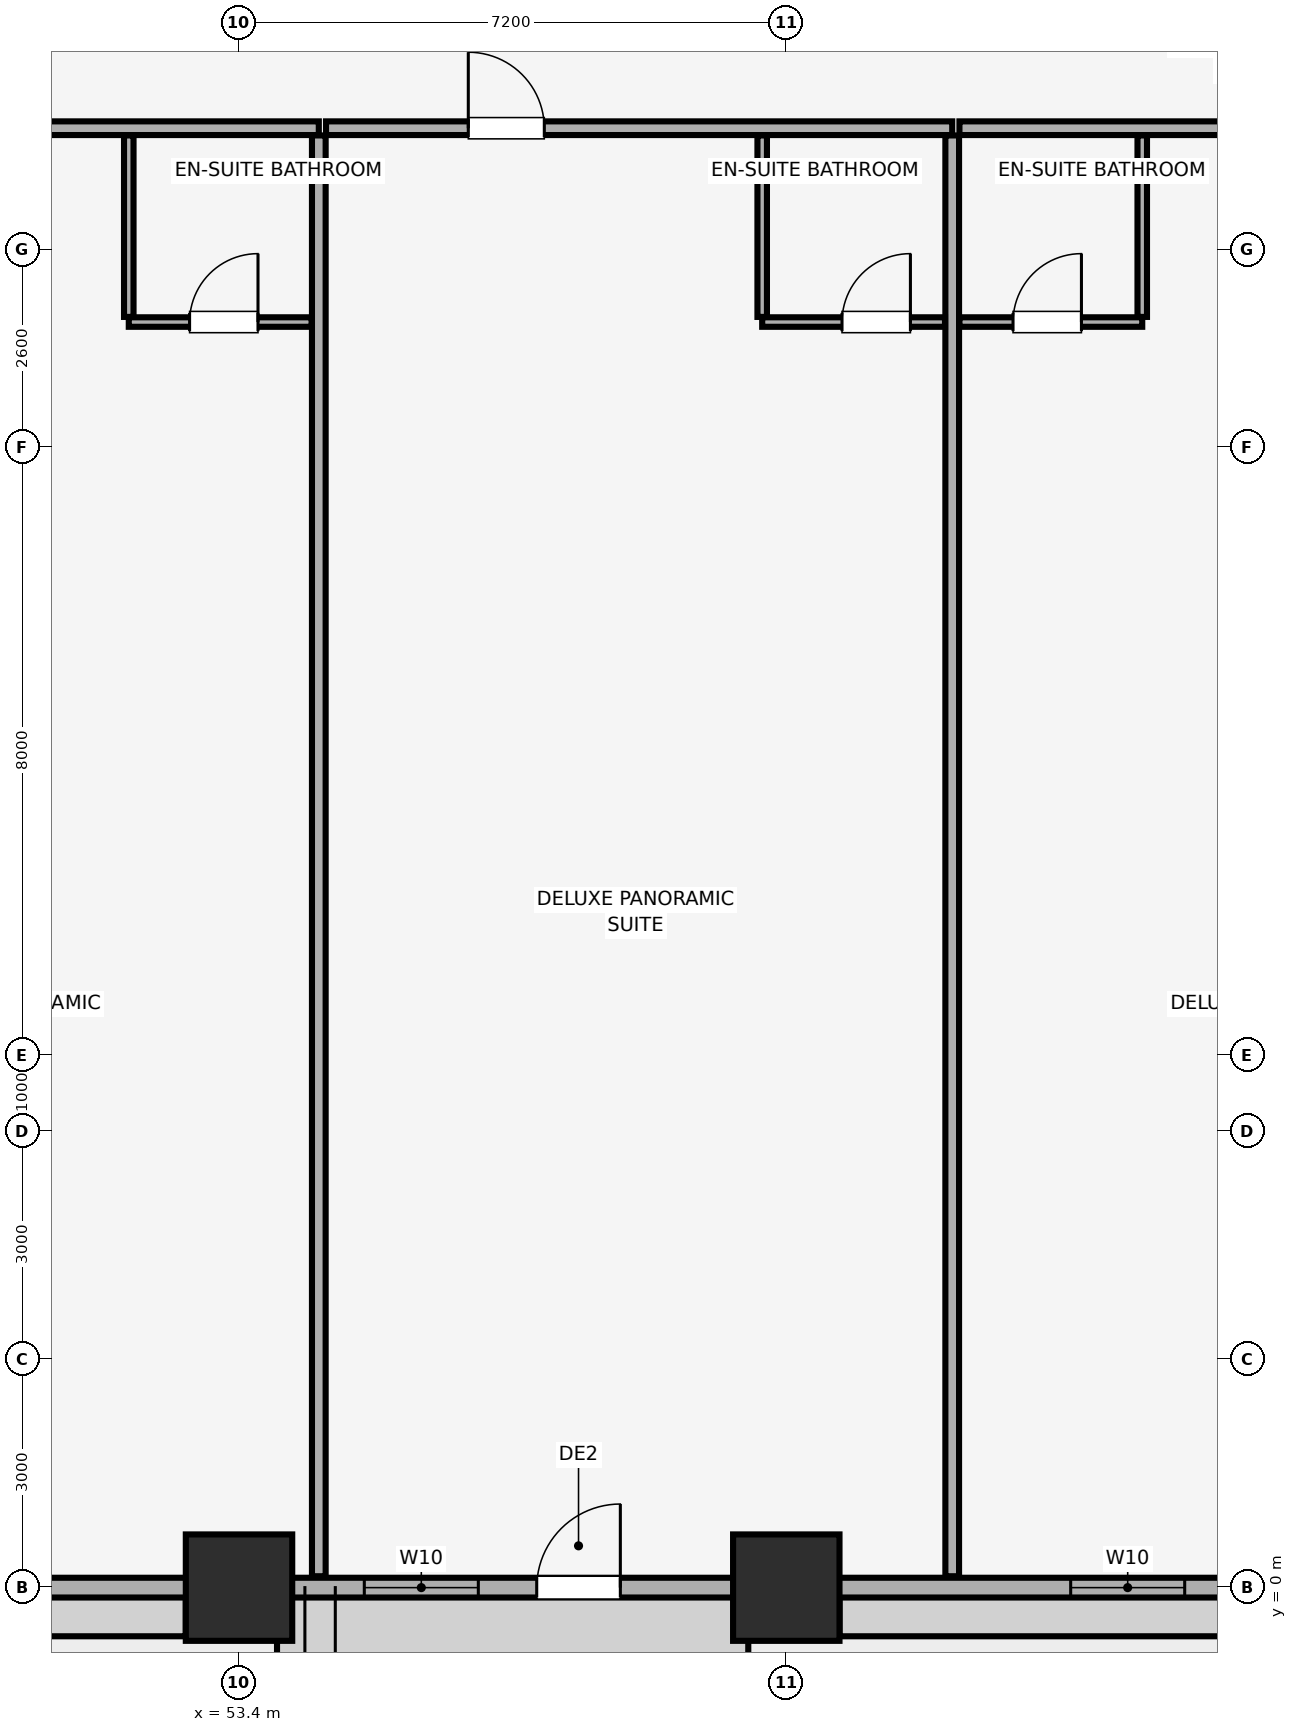
"""IFC4 building model, lengths in metres.
Left out: names, types, materials, properties, quantities, classifications, styles, units other than length and angle.
Written with IfcOpenShell. Run it as: python <this file> out.ifc"""

import sys

from ifc_helpers import new_model, si_unit, direction, frame, frame_2d, origin, origin_2d, place, context, subcontext, project, spatial, rectangle, extrude, element, fill, save


model = new_model("IFC4")
c1 = context("Model", 3, precision=1e-05, world=origin(), true_north=direction((0.0, 1.0)))
c2 = subcontext(c1, "Body", "Model", "MODEL_VIEW")
j1 = project(units=[si_unit("LENGTHUNIT", "METRE"), si_unit("PLANEANGLEUNIT", "RADIAN")], contexts=[c1])
p1 = place(None, origin())
s1 = spatial("IfcSite", under=j1, at=p1, CompositionType="ELEMENT")
p2 = place(p1, origin())
s2 = spatial("IfcBuilding", under=s1, at=p2, CompositionType="ELEMENT")
p3 = place(p2, frame((0.0, 0.0, 76.4)))
s3 = spatial("IfcBuildingStorey", under=s2, at=p3, CompositionType="ELEMENT", Elevation=76.4)
for number, where, z_axis, x_axis in (
    (1, (53.4, 0.0, 0.0), (0.0, 0.0, 1.0), (1.0, 0.0, 0.0)),
    (2, (60.6, 0.0, 0.0), (0.0, 0.0, 1.0), (1.0, 0.0, 0.0)),
):
    element("IfcColumn", number, at=place(p3, frame(where, z_axis=z_axis, x_axis=x_axis)), inside=s3, PredefinedType="COLUMN", context=c2, shape_type="SweptSolid", body=[
        extrude(rectangle(XDim=1.4, YDim=1.4, at=origin_2d()), origin(), (0.0, 0.0, 1.0), 3.4),
    ])
p4 = place(p3, frame((4.2, 0.0, 0.0), z_axis=(0.0, 0.0, 1.0), x_axis=(1.0, 0.0, 0.0)))
e3 = element("IfcWall", 3, at=p4, inside=s3, PredefinedType="SOLIDWALL", context=c2, shape_type="SweptSolid", body=[
    extrude(rectangle(XDim=75.6, YDim=0.26, at=frame_2d((37.8, 0.0))), origin(), (0.0, 0.0, 1.0), 2.45),
])
p5 = place(p4, frame((21.383, 0.0, 0.0)))
e4 = element("IfcOpeningElement", 4, at=p5, cuts=e3, PredefinedType="OPENING", context=c2, shape_type="SweptSolid", body=[
    extrude(rectangle(XDim=1.1, YDim=2.15, at=frame_2d((0.55, 1.075))), frame((0.0, 0.14, 0.0), z_axis=(0.0, -1.0, 0.0), x_axis=(1.0, 0.0, 0.0)), (0.0, 0.0, 1.0), 0.28),
])
p6 = place(p4, frame((37.25, 0.0, 0.0)))
e5 = element("IfcOpeningElement", 5, at=p6, cuts=e3, PredefinedType="OPENING", context=c2, shape_type="SweptSolid", body=[
    extrude(rectangle(XDim=1.1, YDim=2.15, at=frame_2d((0.55, 1.075))), frame((0.0, 0.14, 0.0), z_axis=(0.0, -1.0, 0.0), x_axis=(1.0, 0.0, 0.0)), (0.0, 0.0, 1.0), 0.28),
])
p7 = place(p4, frame((53.117, 0.0, 0.0)))
e6 = element("IfcOpeningElement", 6, at=p7, cuts=e3, PredefinedType="OPENING", context=c2, shape_type="SweptSolid", body=[
    extrude(rectangle(XDim=1.1, YDim=2.15, at=frame_2d((0.55, 1.075))), frame((0.0, 0.14, 0.0), z_axis=(0.0, -1.0, 0.0), x_axis=(1.0, 0.0, 0.0)), (0.0, 0.0, 1.0), 0.28),
])
p8 = place(p4, frame((1.485, 0.0, 0.85)))
e7 = element("IfcOpeningElement", 7, at=p8, cuts=e3, PredefinedType="OPENING", context=c2, shape_type="SweptSolid", body=[
    extrude(rectangle(XDim=1.5, YDim=1.4, at=frame_2d((0.75, 0.7))), frame((0.0, 0.14, 0.0), z_axis=(0.0, -1.0, 0.0), x_axis=(1.0, 0.0, 0.0)), (0.0, 0.0, 1.0), 0.28),
])
p9 = place(p4, frame((6.142, 0.0, 0.85)))
e8 = element("IfcOpeningElement", 8, at=p9, cuts=e3, PredefinedType="OPENING", context=c2, shape_type="SweptSolid", body=[
    extrude(rectangle(XDim=1.5, YDim=1.4, at=frame_2d((0.75, 0.7))), frame((0.0, 0.14, 0.0), z_axis=(0.0, -1.0, 0.0), x_axis=(1.0, 0.0, 0.0)), (0.0, 0.0, 1.0), 0.28),
])
p10 = place(p4, frame((9.342, 0.0, 0.85)))
e9 = element("IfcOpeningElement", 9, at=p10, cuts=e3, PredefinedType="OPENING", context=c2, shape_type="SweptSolid", body=[
    extrude(rectangle(XDim=1.5, YDim=1.4, at=frame_2d((0.75, 0.7))), frame((0.0, 0.14, 0.0), z_axis=(0.0, -1.0, 0.0), x_axis=(1.0, 0.0, 0.0)), (0.0, 0.0, 1.0), 0.28),
])
p11 = place(p4, frame((13.908, 0.0, 0.85)))
e10 = element("IfcOpeningElement", 10, at=p11, cuts=e3, PredefinedType="OPENING", context=c2, shape_type="SweptSolid", body=[
    extrude(rectangle(XDim=1.5, YDim=1.4, at=frame_2d((0.75, 0.7))), frame((0.0, 0.14, 0.0), z_axis=(0.0, -1.0, 0.0), x_axis=(1.0, 0.0, 0.0)), (0.0, 0.0, 1.0), 0.28),
])
p12 = place(p4, frame((23.202, 0.0, 0.85)))
e11 = element("IfcOpeningElement", 11, at=p12, cuts=e3, PredefinedType="OPENING", context=c2, shape_type="SweptSolid", body=[
    extrude(rectangle(XDim=1.5, YDim=1.4, at=frame_2d((0.75, 0.7))), frame((0.0, 0.14, 0.0), z_axis=(0.0, -1.0, 0.0), x_axis=(1.0, 0.0, 0.0)), (0.0, 0.0, 1.0), 0.28),
])
p13 = place(p4, frame((29.25, 0.0, 0.85)))
e12 = element("IfcOpeningElement", 12, at=p13, cuts=e3, PredefinedType="OPENING", context=c2, shape_type="SweptSolid", body=[
    extrude(rectangle(XDim=1.5, YDim=1.4, at=frame_2d((0.75, 0.7))), frame((0.0, 0.14, 0.0), z_axis=(0.0, -1.0, 0.0), x_axis=(1.0, 0.0, 0.0)), (0.0, 0.0, 1.0), 0.28),
])
p14 = place(p4, frame((34.79, 0.0, 0.85)))
e13 = element("IfcOpeningElement", 13, at=p14, cuts=e3, PredefinedType="OPENING", context=c2, shape_type="SweptSolid", body=[
    extrude(rectangle(XDim=1.5, YDim=1.4, at=frame_2d((0.75, 0.7))), frame((0.0, 0.14, 0.0), z_axis=(0.0, -1.0, 0.0), x_axis=(1.0, 0.0, 0.0)), (0.0, 0.0, 1.0), 0.28),
])
p15 = place(p4, frame((39.31, 0.0, 0.85)))
e14 = element("IfcOpeningElement", 14, at=p15, cuts=e3, PredefinedType="OPENING", context=c2, shape_type="SweptSolid", body=[
    extrude(rectangle(XDim=1.5, YDim=1.4, at=frame_2d((0.75, 0.7))), frame((0.0, 0.14, 0.0), z_axis=(0.0, -1.0, 0.0), x_axis=(1.0, 0.0, 0.0)), (0.0, 0.0, 1.0), 0.28),
])
p16 = place(p4, frame((44.85, 0.0, 0.85)))
e15 = element("IfcOpeningElement", 15, at=p16, cuts=e3, PredefinedType="OPENING", context=c2, shape_type="SweptSolid", body=[
    extrude(rectangle(XDim=1.5, YDim=1.4, at=frame_2d((0.75, 0.7))), frame((0.0, 0.14, 0.0), z_axis=(0.0, -1.0, 0.0), x_axis=(1.0, 0.0, 0.0)), (0.0, 0.0, 1.0), 0.28),
])
p17 = place(p4, frame((50.848, 0.0, 0.85)))
e16 = element("IfcOpeningElement", 16, at=p17, cuts=e3, PredefinedType="OPENING", context=c2, shape_type="SweptSolid", body=[
    extrude(rectangle(XDim=1.5, YDim=1.4, at=frame_2d((0.75, 0.7))), frame((0.0, 0.14, 0.0), z_axis=(0.0, -1.0, 0.0), x_axis=(1.0, 0.0, 0.0)), (0.0, 0.0, 1.0), 0.28),
])
p18 = place(p4, frame((60.142, 0.0, 0.85)))
e17 = element("IfcOpeningElement", 17, at=p18, cuts=e3, PredefinedType="OPENING", context=c2, shape_type="SweptSolid", body=[
    extrude(rectangle(XDim=1.5, YDim=1.4, at=frame_2d((0.75, 0.7))), frame((0.0, 0.14, 0.0), z_axis=(0.0, -1.0, 0.0), x_axis=(1.0, 0.0, 0.0)), (0.0, 0.0, 1.0), 0.28),
])
p19 = place(p4, frame((64.708, 0.0, 0.85)))
e18 = element("IfcOpeningElement", 18, at=p19, cuts=e3, PredefinedType="OPENING", context=c2, shape_type="SweptSolid", body=[
    extrude(rectangle(XDim=1.5, YDim=1.4, at=frame_2d((0.75, 0.7))), frame((0.0, 0.14, 0.0), z_axis=(0.0, -1.0, 0.0), x_axis=(1.0, 0.0, 0.0)), (0.0, 0.0, 1.0), 0.28),
])
p20 = place(p4, frame((67.908, 0.0, 0.85)))
e19 = element("IfcOpeningElement", 19, at=p20, cuts=e3, PredefinedType="OPENING", context=c2, shape_type="SweptSolid", body=[
    extrude(rectangle(XDim=1.5, YDim=1.4, at=frame_2d((0.75, 0.7))), frame((0.0, 0.14, 0.0), z_axis=(0.0, -1.0, 0.0), x_axis=(1.0, 0.0, 0.0)), (0.0, 0.0, 1.0), 0.28),
])
p21 = place(p4, frame((72.615, 0.0, 0.85)))
e20 = element("IfcOpeningElement", 20, at=p21, cuts=e3, PredefinedType="OPENING", context=c2, shape_type="SweptSolid", body=[
    extrude(rectangle(XDim=1.5, YDim=1.4, at=frame_2d((0.75, 0.7))), frame((0.0, 0.14, 0.0), z_axis=(0.0, -1.0, 0.0), x_axis=(1.0, 0.0, 0.0)), (0.0, 0.0, 1.0), 0.28),
])
p22 = place(p3, frame((46.211, 19.2, 0.0), z_axis=(0.0, 0.0, 1.0), x_axis=(1.0, 0.0, 0.0)))
e21 = element("IfcWall", 21, at=p22, inside=s3, PredefinedType="PARTITIONING", context=c2, shape_type="SweptSolid", body=[
    extrude(rectangle(XDim=8.238, YDim=0.18, at=frame_2d((4.119, 0.0))), origin(), (0.0, 0.0, 1.0), 3.4),
])
p23 = place(p22, frame((2.303, 0.0, 0.0)))
e22 = element("IfcOpeningElement", 22, at=p23, cuts=e21, PredefinedType="OPENING", context=c2, shape_type="SweptSolid", body=[
    extrude(rectangle(XDim=1.0, YDim=2.15, at=frame_2d((0.5, 1.075))), frame((0.0, 0.1, 0.0), z_axis=(0.0, -1.0, 0.0), x_axis=(1.0, 0.0, 0.0)), (0.0, 0.0, 1.0), 0.2),
])
p24 = place(p3, frame((54.45, 0.15, 0.0), z_axis=(0.0, 0.0, 1.0), x_axis=(0.0, 1.0, 0.0)))
e23 = element("IfcWall", 23, at=p24, inside=s3, PredefinedType="PARTITIONING", context=c2, shape_type="SweptSolid", body=[
    extrude(rectangle(XDim=18.955, YDim=0.18, at=frame_2d((9.478, 0.0))), origin(), (0.0, 0.0, 1.0), 3.4),
])
p25 = place(p3, frame((51.95, 16.65, 0.0), z_axis=(0.0, 0.0, 1.0), x_axis=(1.0, 0.0, 0.0)))
e24 = element("IfcWall", 24, at=p25, inside=s3, PredefinedType="PARTITIONING", context=c2, shape_type="SweptSolid", body=[
    extrude(rectangle(XDim=2.405, YDim=0.125, at=frame_2d((1.203, 0.0))), origin(), (0.0, 0.0, 1.0), 3.4),
])
p26 = place(p25, frame((0.8, 0.0, 0.0)))
e25 = element("IfcOpeningElement", 25, at=p26, cuts=e24, PredefinedType="OPENING", context=c2, shape_type="SweptSolid", body=[
    extrude(rectangle(XDim=0.9, YDim=2.1, at=frame_2d((0.45, 1.05))), frame((0.0, 0.073, 0.0), z_axis=(0.0, -1.0, 0.0), x_axis=(1.0, 0.0, 0.0)), (0.0, 0.0, 1.0), 0.145),
])
p27 = place(p3, frame((51.95, 16.718, 0.0), z_axis=(0.0, 0.0, 1.0), x_axis=(0.0, 1.0, 0.0)))
e26 = element("IfcWall", 26, at=p27, inside=s3, PredefinedType="PARTITIONING", context=c2, shape_type="SweptSolid", body=[
    extrude(rectangle(XDim=2.387, YDim=0.125, at=frame_2d((1.194, 0.0))), origin(), (0.0, 0.0, 1.0), 3.4),
])
p28 = place(p3, frame((54.545, 19.2, 0.0), z_axis=(0.0, 0.0, 1.0), x_axis=(1.0, 0.0, 0.0)))
e27 = element("IfcWall", 27, at=p28, inside=s3, PredefinedType="PARTITIONING", context=c2, shape_type="SweptSolid", body=[
    extrude(rectangle(XDim=8.238, YDim=0.18, at=frame_2d((4.119, 0.0))), origin(), (0.0, 0.0, 1.0), 3.4),
])
p29 = place(p28, frame((1.872, 0.0, 0.0)))
e28 = element("IfcOpeningElement", 28, at=p29, cuts=e27, PredefinedType="OPENING", context=c2, shape_type="SweptSolid", body=[
    extrude(rectangle(XDim=1.0, YDim=2.15, at=frame_2d((0.5, 1.075))), frame((0.0, 0.1, 0.0), z_axis=(0.0, -1.0, 0.0), x_axis=(1.0, 0.0, 0.0)), (0.0, 0.0, 1.0), 0.2),
])
p30 = place(p3, frame((62.783, 0.15, 0.0), z_axis=(0.0, 0.0, 1.0), x_axis=(0.0, 1.0, 0.0)))
e29 = element("IfcWall", 29, at=p30, inside=s3, PredefinedType="PARTITIONING", context=c2, shape_type="SweptSolid", body=[
    extrude(rectangle(XDim=18.955, YDim=0.18, at=frame_2d((9.478, 0.0))), origin(), (0.0, 0.0, 1.0), 3.4),
])
p31 = place(p3, frame((60.283, 16.65, 0.0), z_axis=(0.0, 0.0, 1.0), x_axis=(1.0, 0.0, 0.0)))
e30 = element("IfcWall", 30, at=p31, inside=s3, PredefinedType="PARTITIONING", context=c2, shape_type="SweptSolid", body=[
    extrude(rectangle(XDim=2.405, YDim=0.125, at=frame_2d((1.203, 0.0))), origin(), (0.0, 0.0, 1.0), 3.4),
])
p32 = place(p31, frame((1.05, 0.0, 0.0)))
e31 = element("IfcOpeningElement", 31, at=p32, cuts=e30, PredefinedType="OPENING", context=c2, shape_type="SweptSolid", body=[
    extrude(rectangle(XDim=0.9, YDim=2.1, at=frame_2d((0.45, 1.05))), frame((0.0, 0.073, 0.0), z_axis=(0.0, -1.0, 0.0), x_axis=(1.0, 0.0, 0.0)), (0.0, 0.0, 1.0), 0.145),
])
p33 = place(p3, frame((60.283, 16.718, 0.0), z_axis=(0.0, 0.0, 1.0), x_axis=(0.0, 1.0, 0.0)))
e32 = element("IfcWall", 32, at=p33, inside=s3, PredefinedType="PARTITIONING", context=c2, shape_type="SweptSolid", body=[
    extrude(rectangle(XDim=2.387, YDim=0.125, at=frame_2d((1.194, 0.0))), origin(), (0.0, 0.0, 1.0), 3.4),
])
p34 = place(p3, frame((62.878, 19.2, 0.0), z_axis=(0.0, 0.0, 1.0), x_axis=(1.0, 0.0, 0.0)))
e33 = element("IfcWall", 33, at=p34, inside=s3, PredefinedType="PARTITIONING", context=c2, shape_type="SweptSolid", body=[
    extrude(rectangle(XDim=8.238, YDim=0.18, at=frame_2d((4.119, 0.0))), origin(), (0.0, 0.0, 1.0), 3.4),
])
p35 = place(p34, frame((6.47, 0.0, 0.0)))
e34 = element("IfcOpeningElement", 34, at=p35, cuts=e33, PredefinedType="OPENING", context=c2, shape_type="SweptSolid", body=[
    extrude(rectangle(XDim=1.0, YDim=2.15, at=frame_2d((0.5, 1.075))), frame((0.0, 0.1, 0.0), z_axis=(0.0, -1.0, 0.0), x_axis=(1.0, 0.0, 0.0)), (0.0, 0.0, 1.0), 0.2),
])
p36 = place(p3, frame((62.878, 16.65, 0.0), z_axis=(0.0, 0.0, 1.0), x_axis=(1.0, 0.0, 0.0)))
e35 = element("IfcWall", 35, at=p36, inside=s3, PredefinedType="PARTITIONING", context=c2, shape_type="SweptSolid", body=[
    extrude(rectangle(XDim=2.405, YDim=0.125, at=frame_2d((1.203, 0.0))), origin(), (0.0, 0.0, 1.0), 3.4),
])
p37 = place(p36, frame((0.705, 0.0, 0.0)))
e36 = element("IfcOpeningElement", 36, at=p37, cuts=e35, PredefinedType="OPENING", context=c2, shape_type="SweptSolid", body=[
    extrude(rectangle(XDim=0.9, YDim=2.1, at=frame_2d((0.45, 1.05))), frame((0.0, 0.073, 0.0), z_axis=(0.0, -1.0, 0.0), x_axis=(1.0, 0.0, 0.0)), (0.0, 0.0, 1.0), 0.145),
])
p38 = place(p3, frame((65.283, 16.718, 0.0), z_axis=(0.0, 0.0, 1.0), x_axis=(0.0, 1.0, 0.0)))
e37 = element("IfcWall", 37, at=p38, inside=s3, PredefinedType="PARTITIONING", context=c2, shape_type="SweptSolid", body=[
    extrude(rectangle(XDim=2.387, YDim=0.125, at=frame_2d((1.194, 0.0))), origin(), (0.0, 0.0, 1.0), 3.4),
])
p39 = place(p7, origin())
e38 = element("IfcDoor", 38, at=p39, inside=s3, OperationType="SINGLE_SWING_RIGHT", PredefinedType="DOOR", context=c2, shape_type="SweptSolid", body=[
    extrude(rectangle(XDim=1.1, YDim=2.15, at=frame_2d((0.55, 1.075))), frame((0.0, 0.025, 0.0), z_axis=(0.0, -1.0, 0.0), x_axis=(1.0, 0.0, 0.0)), (0.0, 0.0, 1.0), 0.05),
])
fill(e6, e38)
p40 = place(p17, origin())
e39 = element("IfcWindow", 39, at=p40, inside=s3, PartitioningType="SINGLE_PANEL", PredefinedType="WINDOW", context=c2, shape_type="SweptSolid", body=[
    extrude(rectangle(XDim=1.5, YDim=1.4, at=frame_2d((0.75, 0.7))), frame((0.0, 0.03, 0.0), z_axis=(0.0, -1.0, 0.0), x_axis=(1.0, 0.0, 0.0)), (0.0, 0.0, 1.0), 0.06),
])
fill(e16, e39)
p41 = place(p18, origin())
e40 = element("IfcWindow", 40, at=p41, inside=s3, PartitioningType="SINGLE_PANEL", PredefinedType="WINDOW", context=c2, shape_type="SweptSolid", body=[
    extrude(rectangle(XDim=1.5, YDim=1.4, at=frame_2d((0.75, 0.7))), frame((0.0, 0.03, 0.0), z_axis=(0.0, -1.0, 0.0), x_axis=(1.0, 0.0, 0.0)), (0.0, 0.0, 1.0), 0.06),
])
fill(e17, e40)
p42 = place(p26, origin())
e41 = element("IfcDoor", 41, at=p42, inside=s3, OperationType="SINGLE_SWING_RIGHT", PredefinedType="DOOR", context=c2, shape_type="SweptSolid", body=[
    extrude(rectangle(XDim=0.9, YDim=2.1, at=frame_2d((0.45, 1.05))), frame((0.0, 0.025, 0.0), z_axis=(0.0, -1.0, 0.0), x_axis=(1.0, 0.0, 0.0)), (0.0, 0.0, 1.0), 0.05),
])
fill(e25, e41)
p43 = place(p29, origin())
e42 = element("IfcDoor", 42, at=p43, inside=s3, OperationType="SINGLE_SWING_LEFT", PredefinedType="DOOR", context=c2, shape_type="SweptSolid", body=[
    extrude(rectangle(XDim=1.0, YDim=2.15, at=frame_2d((0.5, 1.075))), frame((0.0, 0.025, 0.0), z_axis=(0.0, -1.0, 0.0), x_axis=(1.0, 0.0, 0.0)), (0.0, 0.0, 1.0), 0.05),
])
fill(e28, e42)
p44 = place(p32, origin())
e43 = element("IfcDoor", 43, at=p44, inside=s3, OperationType="SINGLE_SWING_RIGHT", PredefinedType="DOOR", context=c2, shape_type="SweptSolid", body=[
    extrude(rectangle(XDim=0.9, YDim=2.1, at=frame_2d((0.45, 1.05))), frame((0.0, 0.025, 0.0), z_axis=(0.0, -1.0, 0.0), x_axis=(1.0, 0.0, 0.0)), (0.0, 0.0, 1.0), 0.05),
])
fill(e31, e43)
p45 = place(p37, origin())
e44 = element("IfcDoor", 44, at=p45, inside=s3, OperationType="SINGLE_SWING_RIGHT", PredefinedType="DOOR", context=c2, shape_type="SweptSolid", body=[
    extrude(rectangle(XDim=0.9, YDim=2.1, at=frame_2d((0.45, 1.05))), frame((0.0, 0.025, 0.0), z_axis=(0.0, -1.0, 0.0), x_axis=(1.0, 0.0, 0.0)), (0.0, 0.0, 1.0), 0.05),
])
fill(e36, e44)
save(model, sys.argv[1])
